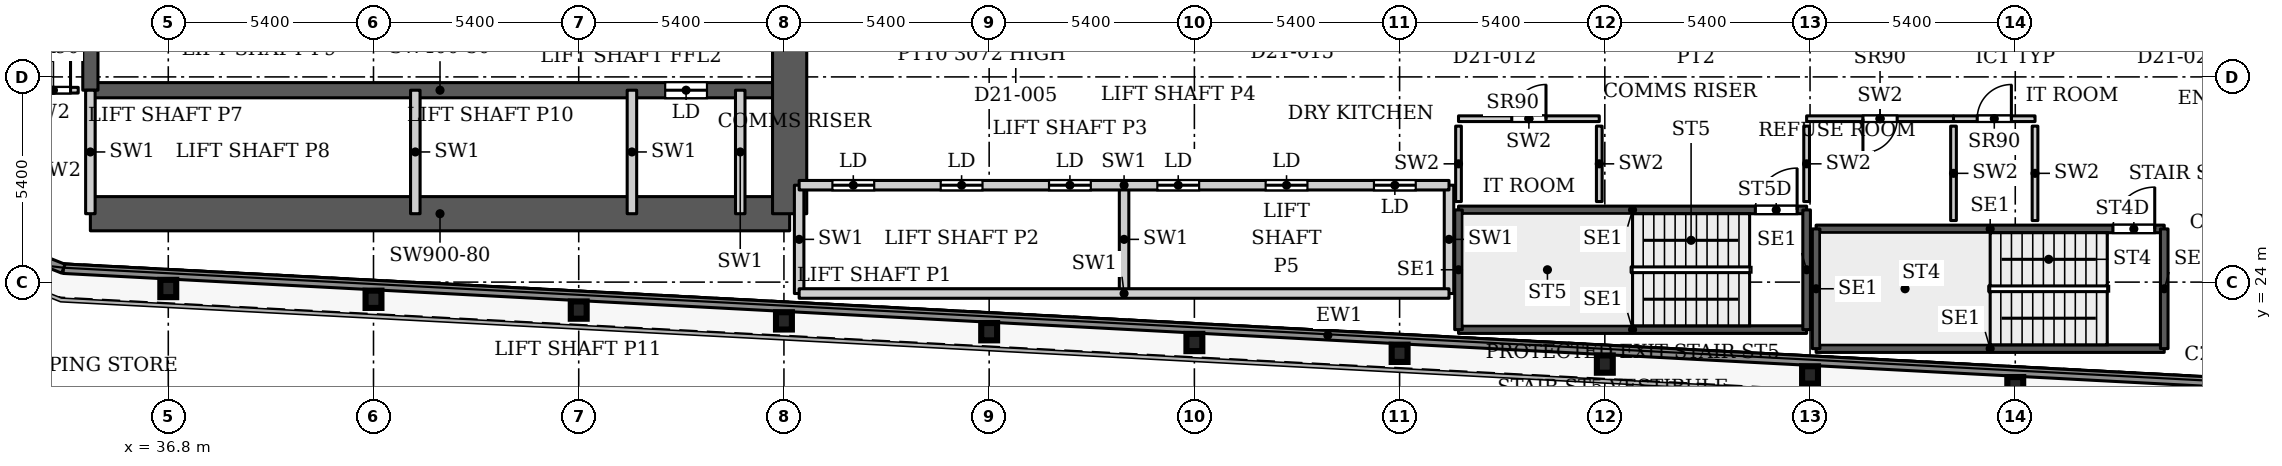
"""IFC4 building model, lengths in metres.
Left out: names, types, materials, properties, quantities, classifications, styles, units other than length and angle.
Written with IfcOpenShell. Run it as: python <this file> out.ifc"""

import sys

from ifc_helpers import new_model, si_unit, direction, frame, frame_2d, origin, origin_2d, place, context, subcontext, project, spatial, rectangle, i_section, extrude, source, transform, mapped, element, fill, save


model = new_model("IFC4")
c1 = context("Model", 3, precision=1e-05, world=origin(), true_north=direction((0.0, 1.0)))
c2 = subcontext(c1, "Body", "Model", "MODEL_VIEW")
j1 = project(units=[si_unit("LENGTHUNIT", "METRE"), si_unit("PLANEANGLEUNIT", "RADIAN")], contexts=[c1])
p1 = place(None, origin())
s1 = spatial("IfcSite", under=j1, at=p1, CompositionType="ELEMENT")
p2 = place(p1, origin())
s2 = spatial("IfcBuilding", under=s1, at=p2, CompositionType="ELEMENT")
p3 = place(p2, frame((0.0, 0.0, 94.1)))
s3 = spatial("IfcBuildingStorey", under=s2, at=p3, CompositionType="ELEMENT", Elevation=94.1)
for number, where, z_axis, x_axis in (
    (1, (85.4, 21.274, 0.0), (0.0, 0.0, 1.0), (1.0, 0.0, 0.0)),
    (2, (80.0, 21.558, 0.0), (0.0, 0.0, 1.0), (1.0, 0.0, 0.0)),
    (3, (74.6, 21.843, 0.0), (0.0, 0.0, 1.0), (1.0, 0.0, 0.0)),
    (4, (69.2, 22.127, 0.0), (0.0, 0.0, 1.0), (1.0, 0.0, 0.0)),
    (5, (63.8, 22.411, 0.0), (0.0, 0.0, 1.0), (1.0, 0.0, 0.0)),
    (6, (58.4, 22.695, 0.0), (0.0, 0.0, 1.0), (1.0, 0.0, 0.0)),
    (7, (53.0, 22.98, 0.0), (0.0, 0.0, 1.0), (1.0, 0.0, 0.0)),
    (8, (47.6, 23.264, 0.0), (0.0, 0.0, 1.0), (1.0, 0.0, 0.0)),
    (9, (42.2, 23.548, 0.0), (0.0, 0.0, 1.0), (1.0, 0.0, 0.0)),
    (10, (36.8, 23.832, 0.0), (0.0, 0.0, 1.0), (1.0, 0.0, 0.0)),
):
    element("IfcColumn", number, at=place(p3, frame(where, z_axis=z_axis, x_axis=x_axis)), inside=s3, PredefinedType="COLUMN", context=c2, shape_type="SweptSolid", body=[
        extrude(i_section(OverallWidth=0.418, OverallDepth=0.455, WebThickness=0.042, FlangeThickness=0.068, FilletRadius=0.014, at=origin_2d()), origin(), (0.0, 0.0, 1.0), 3.9),
    ])
p4 = place(p3, frame((34.75, 25.8, 0.0), z_axis=(0.0, 0.0, 1.0), x_axis=(1.0, 0.0, 0.0)))
e11 = element("IfcWall", 11, at=p4, inside=s3, PredefinedType="SHEAR", context=c2, shape_type="SweptSolid", body=[
    extrude(rectangle(XDim=18.4, YDim=0.9, at=frame_2d((9.2, 0.0))), origin(), (0.0, 0.0, 1.0), 3.9),
])
p5 = place(p3, frame((34.75, 29.05, 0.0), z_axis=(0.0, 0.0, 1.0), x_axis=(1.0, 0.0, 0.0)))
e12 = element("IfcWall", 12, at=p5, inside=s3, PredefinedType="SHEAR", context=c2, shape_type="SweptSolid", body=[
    extrude(rectangle(XDim=18.4, YDim=0.4, at=frame_2d((9.2, 0.0))), origin(), (0.0, 0.0, 1.0), 3.9),
])
p6 = place(p5, frame((15.125, 0.0, 0.0)))
e13 = element("IfcOpeningElement", 13, at=p6, cuts=e12, PredefinedType="OPENING", context=c2, shape_type="SweptSolid", body=[
    extrude(rectangle(XDim=1.1, YDim=2.2, at=frame_2d((0.55, 1.1))), frame((0.0, 0.21, 0.0), z_axis=(0.0, -1.0, 0.0), x_axis=(1.0, 0.0, 0.0)), (0.0, 0.0, 1.0), 0.42),
])
p7 = place(p3, frame((34.75, 29.05, 0.0), z_axis=(0.0, 0.0, 1.0), x_axis=(0.0, 1.0, 0.0)))
e14 = element("IfcWall", 14, at=p7, inside=s3, PredefinedType="SHEAR", context=c2, shape_type="SweptSolid", body=[
    extrude(rectangle(XDim=18.45, YDim=0.4, at=frame_2d((9.225, 0.0))), origin(), (0.0, 0.0, 1.0), 3.9),
])
p8 = place(p7, frame((8.025, 0.0, 0.0)))
e15 = element("IfcOpeningElement", 15, at=p8, cuts=e14, PredefinedType="OPENING", context=c2, shape_type="SweptSolid", body=[
    extrude(rectangle(XDim=1.1, YDim=2.2, at=frame_2d((0.55, 1.1))), frame((0.0, 0.21, 0.0), z_axis=(0.0, -1.0, 0.0), x_axis=(1.0, 0.0, 0.0)), (0.0, 0.0, 1.0), 0.42),
])
p9 = place(p7, frame((10.875, 0.0, 0.0)))
e16 = element("IfcOpeningElement", 16, at=p9, cuts=e14, PredefinedType="OPENING", context=c2, shape_type="SweptSolid", body=[
    extrude(rectangle(XDim=1.1, YDim=2.2, at=frame_2d((0.55, 1.1))), frame((0.0, 0.21, 0.0), z_axis=(0.0, -1.0, 0.0), x_axis=(1.0, 0.0, 0.0)), (0.0, 0.0, 1.0), 0.42),
])
p10 = place(p7, frame((13.725, 0.0, 0.0)))
e17 = element("IfcOpeningElement", 17, at=p10, cuts=e14, PredefinedType="OPENING", context=c2, shape_type="SweptSolid", body=[
    extrude(rectangle(XDim=1.1, YDim=2.2, at=frame_2d((0.55, 1.1))), frame((0.0, 0.21, 0.0), z_axis=(0.0, -1.0, 0.0), x_axis=(1.0, 0.0, 0.0)), (0.0, 0.0, 1.0), 0.42),
])
p11 = place(p7, frame((15.95, 0.0, 0.0)))
e18 = element("IfcOpeningElement", 18, at=p11, cuts=e14, PredefinedType="OPENING", context=c2, shape_type="SweptSolid", body=[
    extrude(rectangle(XDim=1.1, YDim=2.2, at=frame_2d((0.55, 1.1))), frame((0.0, 0.21, 0.0), z_axis=(0.0, -1.0, 0.0), x_axis=(1.0, 0.0, 0.0)), (0.0, 0.0, 1.0), 0.42),
])
p12 = place(p3, frame((53.15, 25.8, 0.0), z_axis=(0.0, 0.0, 1.0), x_axis=(0.0, 1.0, 0.0)))
e19 = element("IfcWall", 19, at=p12, inside=s3, PredefinedType="SHEAR", context=c2, shape_type="SweptSolid", body=[
    extrude(rectangle(XDim=10.4, YDim=0.9, at=frame_2d((5.2, 0.0))), origin(), (0.0, 0.0, 1.0), 3.9),
])
p13 = place(p3, frame((100.586, 20.85, 0.0), z_axis=(0.0, 0.0, 1.0), x_axis=(-0.99861746497, 0.052565755559, 0.0)))
e20 = element("IfcWall", 20, at=p13, inside=s3, PredefinedType="SOLIDWALL", context=c2, shape_type="SweptSolid", body=[
    extrude(rectangle(XDim=66.639, YDim=0.25, at=frame_2d((33.319, 0.0))), origin(), (0.0, 0.0, 1.0), 3.75),
])
p14 = place(p3, frame((34.039, 24.353, 0.0), z_axis=(0.0, 0.0, 1.0), x_axis=(-0.929352825399, 0.369192803184, 0.0)))
e21 = element("IfcWall", 21, at=p14, inside=s3, PredefinedType="SOLIDWALL", context=c2, shape_type="SweptSolid", body=[
    extrude(rectangle(XDim=4.656, YDim=0.25, at=frame_2d((2.328, 0.0))), origin(), (0.0, 0.0, 1.0), 3.75),
])
p15 = place(p3, frame((80.16, 22.25, 0.0), z_axis=(0.0, 0.0, 1.0), x_axis=(1.0, 0.0, 0.0)))
e22 = element("IfcWall", 22, at=p15, inside=s3, PredefinedType="SHEAR", context=c2, shape_type="SweptSolid", body=[
    extrude(rectangle(XDim=9.16, YDim=0.2, at=frame_2d((4.58, 0.0))), origin(), (0.0, 0.0, 1.0), 3.9),
])
p16 = place(p3, frame((80.16, 25.4, 0.0), z_axis=(0.0, 0.0, 1.0), x_axis=(1.0, 0.0, 0.0)))
e23 = element("IfcWall", 23, at=p16, inside=s3, PredefinedType="SHEAR", context=c2, shape_type="SweptSolid", body=[
    extrude(rectangle(XDim=9.16, YDim=0.2, at=frame_2d((4.58, 0.0))), origin(), (0.0, 0.0, 1.0), 3.9),
])
p17 = place(p16, frame((7.81, 0.0, 0.0)))
e24 = element("IfcOpeningElement", 24, at=p17, cuts=e23, PredefinedType="OPENING", context=c2, shape_type="SweptSolid", body=[
    extrude(rectangle(XDim=1.1, YDim=2.2, at=frame_2d((0.55, 1.1))), frame((0.0, 0.11, 0.0), z_axis=(0.0, -1.0, 0.0), x_axis=(1.0, 0.0, 0.0)), (0.0, 0.0, 1.0), 0.22),
])
for number, where, z_axis, x_axis in (
    (25, (80.16, 22.25, 0.0), (0.0, 0.0, 1.0), (0.0, 1.0, 0.0)),
    (26, (89.32, 22.25, 0.0), (0.0, 0.0, 1.0), (0.0, 1.0, 0.0)),
):
    element("IfcWall", number, at=place(p3, frame(where, z_axis=z_axis, x_axis=x_axis)), inside=s3, PredefinedType="SHEAR", context=c2, shape_type="SweptSolid", body=[
        extrude(rectangle(XDim=3.15, YDim=0.2, at=frame_2d((1.575, 0.0))), origin(), (0.0, 0.0, 1.0), 3.9),
    ])
p18 = place(p3, frame((70.75, 22.75, 0.0), z_axis=(0.0, 0.0, 1.0), x_axis=(1.0, 0.0, 0.0)))
e27 = element("IfcWall", 27, at=p18, inside=s3, PredefinedType="SHEAR", context=c2, shape_type="SweptSolid", body=[
    extrude(rectangle(XDim=9.16, YDim=0.2, at=frame_2d((4.58, 0.0))), origin(), (0.0, 0.0, 1.0), 3.9),
])
p19 = place(p3, frame((70.75, 25.9, 0.0), z_axis=(0.0, 0.0, 1.0), x_axis=(1.0, 0.0, 0.0)))
e28 = element("IfcWall", 28, at=p19, inside=s3, PredefinedType="SHEAR", context=c2, shape_type="SweptSolid", body=[
    extrude(rectangle(XDim=9.16, YDim=0.2, at=frame_2d((4.58, 0.0))), origin(), (0.0, 0.0, 1.0), 3.9),
])
p20 = place(p19, frame((7.81, 0.0, 0.0)))
e29 = element("IfcOpeningElement", 29, at=p20, cuts=e28, PredefinedType="OPENING", context=c2, shape_type="SweptSolid", body=[
    extrude(rectangle(XDim=1.1, YDim=2.2, at=frame_2d((0.55, 1.1))), frame((0.0, 0.11, 0.0), z_axis=(0.0, -1.0, 0.0), x_axis=(1.0, 0.0, 0.0)), (0.0, 0.0, 1.0), 0.22),
])
for number, where, z_axis, x_axis in (
    (30, (70.75, 22.75, 0.0), (0.0, 0.0, 1.0), (0.0, 1.0, 0.0)),
    (31, (79.91, 22.75, 0.0), (0.0, 0.0, 1.0), (0.0, 1.0, 0.0)),
):
    element("IfcWall", number, at=place(p3, frame(where, z_axis=z_axis, x_axis=x_axis)), inside=s3, PredefinedType="SHEAR", context=c2, shape_type="SweptSolid", body=[
        extrude(rectangle(XDim=3.15, YDim=0.2, at=frame_2d((1.575, 0.0))), origin(), (0.0, 0.0, 1.0), 3.9),
    ])
for number, where, z_axis, x_axis in (
    (32, (34.75, 25.8, 0.0), (0.0, 0.0, 1.0), (0.0, 1.0, 0.0)),
    (33, (43.3, 25.8, 0.0), (0.0, 0.0, 1.0), (0.0, 1.0, 0.0)),
    (34, (49.0, 25.8, 0.0), (0.0, 0.0, 1.0), (0.0, 1.0, 0.0)),
    (35, (51.85, 25.8, 0.0), (0.0, 0.0, 1.0), (0.0, 1.0, 0.0)),
):
    element("IfcWall", number, at=place(p3, frame(where, z_axis=z_axis, x_axis=x_axis)), inside=s3, PredefinedType="PARTITIONING", context=c2, shape_type="SweptSolid", body=[
        extrude(rectangle(XDim=3.25, YDim=0.25, at=frame_2d((1.625, 0.0))), origin(), (0.0, 0.0, 1.0), 3.9),
    ])
for number, where, z_axis, x_axis in (
    (36, (53.4, 23.7, 0.0), (0.0, 0.0, 1.0), (0.0, 1.0, 0.0)),
    (37, (61.95, 23.7, 0.0), (0.0, 0.0, 1.0), (0.0, 1.0, 0.0)),
    (38, (70.5, 23.7, 0.0), (0.0, 0.0, 1.0), (0.0, 1.0, 0.0)),
):
    element("IfcWall", number, at=place(p3, frame(where, z_axis=z_axis, x_axis=x_axis)), inside=s3, PredefinedType="PARTITIONING", context=c2, shape_type="SweptSolid", body=[
        extrude(rectangle(XDim=2.85, YDim=0.25, at=frame_2d((1.425, 0.0))), origin(), (0.0, 0.0, 1.0), 3.9),
    ])
p21 = place(p3, frame((53.4, 23.7, 0.0), z_axis=(0.0, 0.0, 1.0), x_axis=(1.0, 0.0, 0.0)))
e39 = element("IfcWall", 39, at=p21, inside=s3, PredefinedType="PARTITIONING", context=c2, shape_type="SweptSolid", body=[
    extrude(rectangle(XDim=17.1, YDim=0.25, at=frame_2d((8.55, 0.0))), origin(), (0.0, 0.0, 1.0), 3.9),
])
p22 = place(p3, frame((53.4, 26.55, 0.0), z_axis=(0.0, 0.0, 1.0), x_axis=(1.0, 0.0, 0.0)))
e40 = element("IfcWall", 40, at=p22, inside=s3, PredefinedType="PARTITIONING", context=c2, shape_type="SweptSolid", body=[
    extrude(rectangle(XDim=17.1, YDim=0.25, at=frame_2d((8.55, 0.0))), origin(), (0.0, 0.0, 1.0), 3.9),
])
p23 = place(p22, frame((0.875, 0.0, 0.0)))
e41 = element("IfcOpeningElement", 41, at=p23, cuts=e40, PredefinedType="OPENING", context=c2, shape_type="SweptSolid", body=[
    extrude(rectangle(XDim=1.1, YDim=2.2, at=frame_2d((0.55, 1.1))), frame((0.0, 0.135, 0.0), z_axis=(0.0, -1.0, 0.0), x_axis=(1.0, 0.0, 0.0)), (0.0, 0.0, 1.0), 0.27),
])
p24 = place(p22, frame((3.725, 0.0, 0.0)))
e42 = element("IfcOpeningElement", 42, at=p24, cuts=e40, PredefinedType="OPENING", context=c2, shape_type="SweptSolid", body=[
    extrude(rectangle(XDim=1.1, YDim=2.2, at=frame_2d((0.55, 1.1))), frame((0.0, 0.135, 0.0), z_axis=(0.0, -1.0, 0.0), x_axis=(1.0, 0.0, 0.0)), (0.0, 0.0, 1.0), 0.27),
])
p25 = place(p22, frame((6.575, 0.0, 0.0)))
e43 = element("IfcOpeningElement", 43, at=p25, cuts=e40, PredefinedType="OPENING", context=c2, shape_type="SweptSolid", body=[
    extrude(rectangle(XDim=1.1, YDim=2.2, at=frame_2d((0.55, 1.1))), frame((0.0, 0.135, 0.0), z_axis=(0.0, -1.0, 0.0), x_axis=(1.0, 0.0, 0.0)), (0.0, 0.0, 1.0), 0.27),
])
p26 = place(p22, frame((9.425, 0.0, 0.0)))
e44 = element("IfcOpeningElement", 44, at=p26, cuts=e40, PredefinedType="OPENING", context=c2, shape_type="SweptSolid", body=[
    extrude(rectangle(XDim=1.1, YDim=2.2, at=frame_2d((0.55, 1.1))), frame((0.0, 0.135, 0.0), z_axis=(0.0, -1.0, 0.0), x_axis=(1.0, 0.0, 0.0)), (0.0, 0.0, 1.0), 0.27),
])
p27 = place(p22, frame((12.275, 0.0, 0.0)))
e45 = element("IfcOpeningElement", 45, at=p27, cuts=e40, PredefinedType="OPENING", context=c2, shape_type="SweptSolid", body=[
    extrude(rectangle(XDim=1.1, YDim=2.2, at=frame_2d((0.55, 1.1))), frame((0.0, 0.135, 0.0), z_axis=(0.0, -1.0, 0.0), x_axis=(1.0, 0.0, 0.0)), (0.0, 0.0, 1.0), 0.27),
])
p28 = place(p22, frame((15.125, 0.0, 0.0)))
e46 = element("IfcOpeningElement", 46, at=p28, cuts=e40, PredefinedType="OPENING", context=c2, shape_type="SweptSolid", body=[
    extrude(rectangle(XDim=1.1, YDim=2.2, at=frame_2d((0.55, 1.1))), frame((0.0, 0.135, 0.0), z_axis=(0.0, -1.0, 0.0), x_axis=(1.0, 0.0, 0.0)), (0.0, 0.0, 1.0), 0.27),
])
p29 = place(p3, frame((32.805, 29.05, 0.0), z_axis=(0.0, 0.0, 1.0), x_axis=(1.0, 0.0, 0.0)))
e47 = element("IfcWall", 47, at=p29, inside=s3, PredefinedType="PARTITIONING", context=c2, shape_type="SweptSolid", body=[
    extrude(rectangle(XDim=1.625, YDim=0.15, at=frame_2d((0.812, 0.0))), origin(), (0.0, 0.0, 1.0), 3.9),
])
p30 = place(p29, frame((0.523, 0.0, 0.0)))
e48 = element("IfcOpeningElement", 48, at=p30, cuts=e47, PredefinedType="OPENING", context=c2, shape_type="SweptSolid", body=[
    extrude(rectangle(XDim=0.9, YDim=2.2, at=frame_2d((0.45, 1.1))), frame((0.0, 0.085, 0.0), z_axis=(0.0, -1.0, 0.0), x_axis=(1.0, 0.0, 0.0)), (0.0, 0.0, 1.0), 0.17),
])
p31 = place(p3, frame((70.75, 28.3, 0.0), z_axis=(0.0, 0.0, 1.0), x_axis=(1.0, 0.0, 0.0)))
e49 = element("IfcWall", 49, at=p31, inside=s3, PredefinedType="PARTITIONING", context=c2, shape_type="SweptSolid", body=[
    extrude(rectangle(XDim=3.704, YDim=0.15, at=frame_2d((1.852, 0.0))), origin(), (0.0, 0.0, 1.0), 3.9),
])
p32 = place(p31, frame((1.402, 0.0, 0.0)))
e50 = element("IfcOpeningElement", 50, at=p32, cuts=e49, PredefinedType="OPENING", context=c2, shape_type="SweptSolid", body=[
    extrude(rectangle(XDim=0.9, YDim=2.2, at=frame_2d((0.45, 1.1))), frame((0.0, 0.085, 0.0), z_axis=(0.0, -1.0, 0.0), x_axis=(1.0, 0.0, 0.0)), (0.0, 0.0, 1.0), 0.17),
])
for number, where, z_axis, x_axis in (
    (51, (70.75, 26.12, 0.0), (0.0, 0.0, 1.0), (0.0, 1.0, 0.0)),
    (52, (74.454, 26.12, 0.0), (0.0, 0.0, 1.0), (0.0, 1.0, 0.0)),
):
    element("IfcWall", number, at=place(p3, frame(where, z_axis=z_axis, x_axis=x_axis)), inside=s3, PredefinedType="PARTITIONING", context=c2, shape_type="SweptSolid", body=[
        extrude(rectangle(XDim=1.985, YDim=0.15, at=frame_2d((0.992, 0.0))), origin(), (0.0, 0.0, 1.0), 3.9),
    ])
p33 = place(p3, frame((79.91, 28.3, 0.0), z_axis=(0.0, 0.0, 1.0), x_axis=(1.0, 0.0, 0.0)))
e53 = element("IfcWall", 53, at=p33, inside=s3, PredefinedType="PARTITIONING", context=c2, shape_type="SweptSolid", body=[
    extrude(rectangle(XDim=3.865, YDim=0.15, at=frame_2d((1.933, 0.0))), origin(), (0.0, 0.0, 1.0), 3.9),
])
p34 = place(p33, frame((1.482, 0.0, 0.0)))
e54 = element("IfcOpeningElement", 54, at=p34, cuts=e53, PredefinedType="OPENING", context=c2, shape_type="SweptSolid", body=[
    extrude(rectangle(XDim=0.9, YDim=2.2, at=frame_2d((0.45, 1.1))), frame((0.0, 0.085, 0.0), z_axis=(0.0, -1.0, 0.0), x_axis=(1.0, 0.0, 0.0)), (0.0, 0.0, 1.0), 0.17),
])
p35 = place(p3, frame((79.91, 26.12, 0.0), z_axis=(0.0, 0.0, 1.0), x_axis=(0.0, 1.0, 0.0)))
e55 = element("IfcWall", 55, at=p35, inside=s3, PredefinedType="PARTITIONING", context=c2, shape_type="SweptSolid", body=[
    extrude(rectangle(XDim=1.985, YDim=0.15, at=frame_2d((0.992, 0.0))), origin(), (0.0, 0.0, 1.0), 3.9),
])
p36 = place(p3, frame((83.775, 25.62, 0.0), z_axis=(0.0, 0.0, 1.0), x_axis=(0.0, 1.0, 0.0)))
e56 = element("IfcWall", 56, at=p36, inside=s3, PredefinedType="PARTITIONING", context=c2, shape_type="SweptSolid", body=[
    extrude(rectangle(XDim=2.485, YDim=0.15, at=frame_2d((1.242, 0.0))), origin(), (0.0, 0.0, 1.0), 3.9),
])
p37 = place(p3, frame((83.775, 28.3, 0.0), z_axis=(0.0, 0.0, 1.0), x_axis=(1.0, 0.0, 0.0)))
e57 = element("IfcWall", 57, at=p37, inside=s3, PredefinedType="PARTITIONING", context=c2, shape_type="SweptSolid", body=[
    extrude(rectangle(XDim=2.145, YDim=0.15, at=frame_2d((1.073, 0.0))), origin(), (0.0, 0.0, 1.0), 3.9),
])
p38 = place(p37, frame((0.623, 0.0, 0.0)))
e58 = element("IfcOpeningElement", 58, at=p38, cuts=e57, PredefinedType="OPENING", context=c2, shape_type="SweptSolid", body=[
    extrude(rectangle(XDim=0.9, YDim=2.2, at=frame_2d((0.45, 1.1))), frame((0.0, 0.085, 0.0), z_axis=(0.0, -1.0, 0.0), x_axis=(1.0, 0.0, 0.0)), (0.0, 0.0, 1.0), 0.17),
])
p39 = place(p3, frame((85.92, 25.62, 0.0), z_axis=(0.0, 0.0, 1.0), x_axis=(0.0, 1.0, 0.0)))
e59 = element("IfcWall", 59, at=p39, inside=s3, PredefinedType="PARTITIONING", context=c2, shape_type="SweptSolid", body=[
    extrude(rectangle(XDim=2.485, YDim=0.15, at=frame_2d((1.242, 0.0))), origin(), (0.0, 0.0, 1.0), 3.9),
])
m1 = source(origin(), c2, "Body", "SweptSolid", [
    extrude(rectangle(XDim=1.1, YDim=2.2, at=frame_2d((0.55, 1.1))), frame((0.0, 0.025, 0.0), z_axis=(0.0, -1.0, 0.0), x_axis=(1.0, 0.0, 0.0)), (0.0, 0.0, 1.0), 0.05),
])
p40 = place(p23, origin())
e60 = element("IfcDoor", 60, at=p40, inside=s3, OperationType="SLIDING_TO_LEFT", PredefinedType="DOOR", context=c2, shape_type="MappedRepresentation", body=[
    mapped(m1, transform((0.0, 0.0, 0.0), x_axis=(1.0, 0.0, 0.0), y_axis=(0.0, 1.0, 0.0), z_axis=(0.0, 0.0, 1.0), scale=1.0)),
])
fill(e41, e60)
p41 = place(p24, origin())
e61 = element("IfcDoor", 61, at=p41, inside=s3, OperationType="SLIDING_TO_LEFT", PredefinedType="DOOR", context=c2, shape_type="MappedRepresentation", body=[
    mapped(m1, transform((0.0, 0.0, 0.0), x_axis=(1.0, 0.0, 0.0), y_axis=(0.0, 1.0, 0.0), z_axis=(0.0, 0.0, 1.0), scale=1.0)),
])
fill(e42, e61)
p42 = place(p25, origin())
e62 = element("IfcDoor", 62, at=p42, inside=s3, OperationType="SLIDING_TO_LEFT", PredefinedType="DOOR", context=c2, shape_type="MappedRepresentation", body=[
    mapped(m1, transform((0.0, 0.0, 0.0), x_axis=(1.0, 0.0, 0.0), y_axis=(0.0, 1.0, 0.0), z_axis=(0.0, 0.0, 1.0), scale=1.0)),
])
fill(e43, e62)
p43 = place(p26, origin())
e63 = element("IfcDoor", 63, at=p43, inside=s3, OperationType="SLIDING_TO_LEFT", PredefinedType="DOOR", context=c2, shape_type="MappedRepresentation", body=[
    mapped(m1, transform((0.0, 0.0, 0.0), x_axis=(1.0, 0.0, 0.0), y_axis=(0.0, 1.0, 0.0), z_axis=(0.0, 0.0, 1.0), scale=1.0)),
])
fill(e44, e63)
p44 = place(p27, origin())
e64 = element("IfcDoor", 64, at=p44, inside=s3, OperationType="SLIDING_TO_LEFT", PredefinedType="DOOR", context=c2, shape_type="MappedRepresentation", body=[
    mapped(m1, transform((0.0, 0.0, 0.0), x_axis=(1.0, 0.0, 0.0), y_axis=(0.0, 1.0, 0.0), z_axis=(0.0, 0.0, 1.0), scale=1.0)),
])
fill(e45, e64)
p45 = place(p28, origin())
e65 = element("IfcDoor", 65, at=p45, inside=s3, OperationType="SLIDING_TO_LEFT", PredefinedType="DOOR", context=c2, shape_type="MappedRepresentation", body=[
    mapped(m1, transform((0.0, 0.0, 0.0), x_axis=(1.0, 0.0, 0.0), y_axis=(0.0, 1.0, 0.0), z_axis=(0.0, 0.0, 1.0), scale=1.0)),
])
fill(e46, e65)
p46 = place(p6, origin())
e66 = element("IfcDoor", 66, at=p46, inside=s3, OperationType="SLIDING_TO_LEFT", PredefinedType="DOOR", context=c2, shape_type="MappedRepresentation", body=[
    mapped(m1, transform((0.0, 0.0, 0.0), x_axis=(1.0, 0.0, 0.0), y_axis=(0.0, 1.0, 0.0), z_axis=(0.0, 0.0, 1.0), scale=1.0)),
])
fill(e13, e66)
m2 = source(origin(), c2, "Body", "SweptSolid", [
    extrude(rectangle(XDim=0.9, YDim=2.2, at=frame_2d((0.45, 1.1))), frame((0.0, 0.025, 0.0), z_axis=(0.0, -1.0, 0.0), x_axis=(1.0, 0.0, 0.0)), (0.0, 0.0, 1.0), 0.05),
])
p47 = place(p30, origin())
e67 = element("IfcDoor", 67, at=p47, inside=s3, OperationType="SINGLE_SWING_LEFT", PredefinedType="DOOR", context=c2, shape_type="MappedRepresentation", body=[
    mapped(m2, transform((0.0, 0.0, 0.0), x_axis=(1.0, 0.0, 0.0), y_axis=(0.0, 1.0, 0.0), z_axis=(0.0, 0.0, 1.0), scale=1.0)),
])
fill(e48, e67)
p48 = place(p32, origin())
e68 = element("IfcDoor", 68, at=p48, inside=s3, OperationType="SINGLE_SWING_LEFT", PredefinedType="DOOR", context=c2, shape_type="MappedRepresentation", body=[
    mapped(m2, transform((0.0, 0.0, 0.0), x_axis=(1.0, 0.0, 0.0), y_axis=(0.0, 1.0, 0.0), z_axis=(0.0, 0.0, 1.0), scale=1.0)),
])
fill(e50, e68)
p49 = place(p34, origin())
e69 = element("IfcDoor", 69, at=p49, inside=s3, OperationType="SINGLE_SWING_RIGHT", PredefinedType="DOOR", context=c2, shape_type="MappedRepresentation", body=[
    mapped(m2, transform((0.0, 0.0, 0.0), x_axis=(1.0, 0.0, 0.0), y_axis=(0.0, 1.0, 0.0), z_axis=(0.0, 0.0, 1.0), scale=1.0)),
])
fill(e54, e69)
p50 = place(p38, origin())
e70 = element("IfcDoor", 70, at=p50, inside=s3, OperationType="SINGLE_SWING_LEFT", PredefinedType="DOOR", context=c2, shape_type="MappedRepresentation", body=[
    mapped(m2, transform((0.0, 0.0, 0.0), x_axis=(1.0, 0.0, 0.0), y_axis=(0.0, 1.0, 0.0), z_axis=(0.0, 0.0, 1.0), scale=1.0)),
])
fill(e58, e70)
m3 = source(origin(), c2, "Body", "SweptSolid", [
    extrude(rectangle(XDim=1.1, YDim=2.2, at=frame_2d((0.55, 1.1))), frame((0.0, 0.025, 0.0), z_axis=(0.0, -1.0, 0.0), x_axis=(1.0, 0.0, 0.0)), (0.0, 0.0, 1.0), 0.05),
])
p51 = place(p17, origin())
e71 = element("IfcDoor", 71, at=p51, inside=s3, OperationType="SINGLE_SWING_LEFT", PredefinedType="DOOR", context=c2, shape_type="MappedRepresentation", body=[
    mapped(m3, transform((0.0, 0.0, 0.0), x_axis=(1.0, 0.0, 0.0), y_axis=(0.0, 1.0, 0.0), z_axis=(0.0, 0.0, 1.0), scale=1.0)),
])
fill(e24, e71)
p52 = place(p20, origin())
e72 = element("IfcDoor", 72, at=p52, inside=s3, OperationType="SINGLE_SWING_LEFT", PredefinedType="DOOR", context=c2, shape_type="MappedRepresentation", body=[
    mapped(m3, transform((0.0, 0.0, 0.0), x_axis=(1.0, 0.0, 0.0), y_axis=(0.0, 1.0, 0.0), z_axis=(0.0, 0.0, 1.0), scale=1.0)),
])
fill(e29, e72)
save(model, sys.argv[1])
